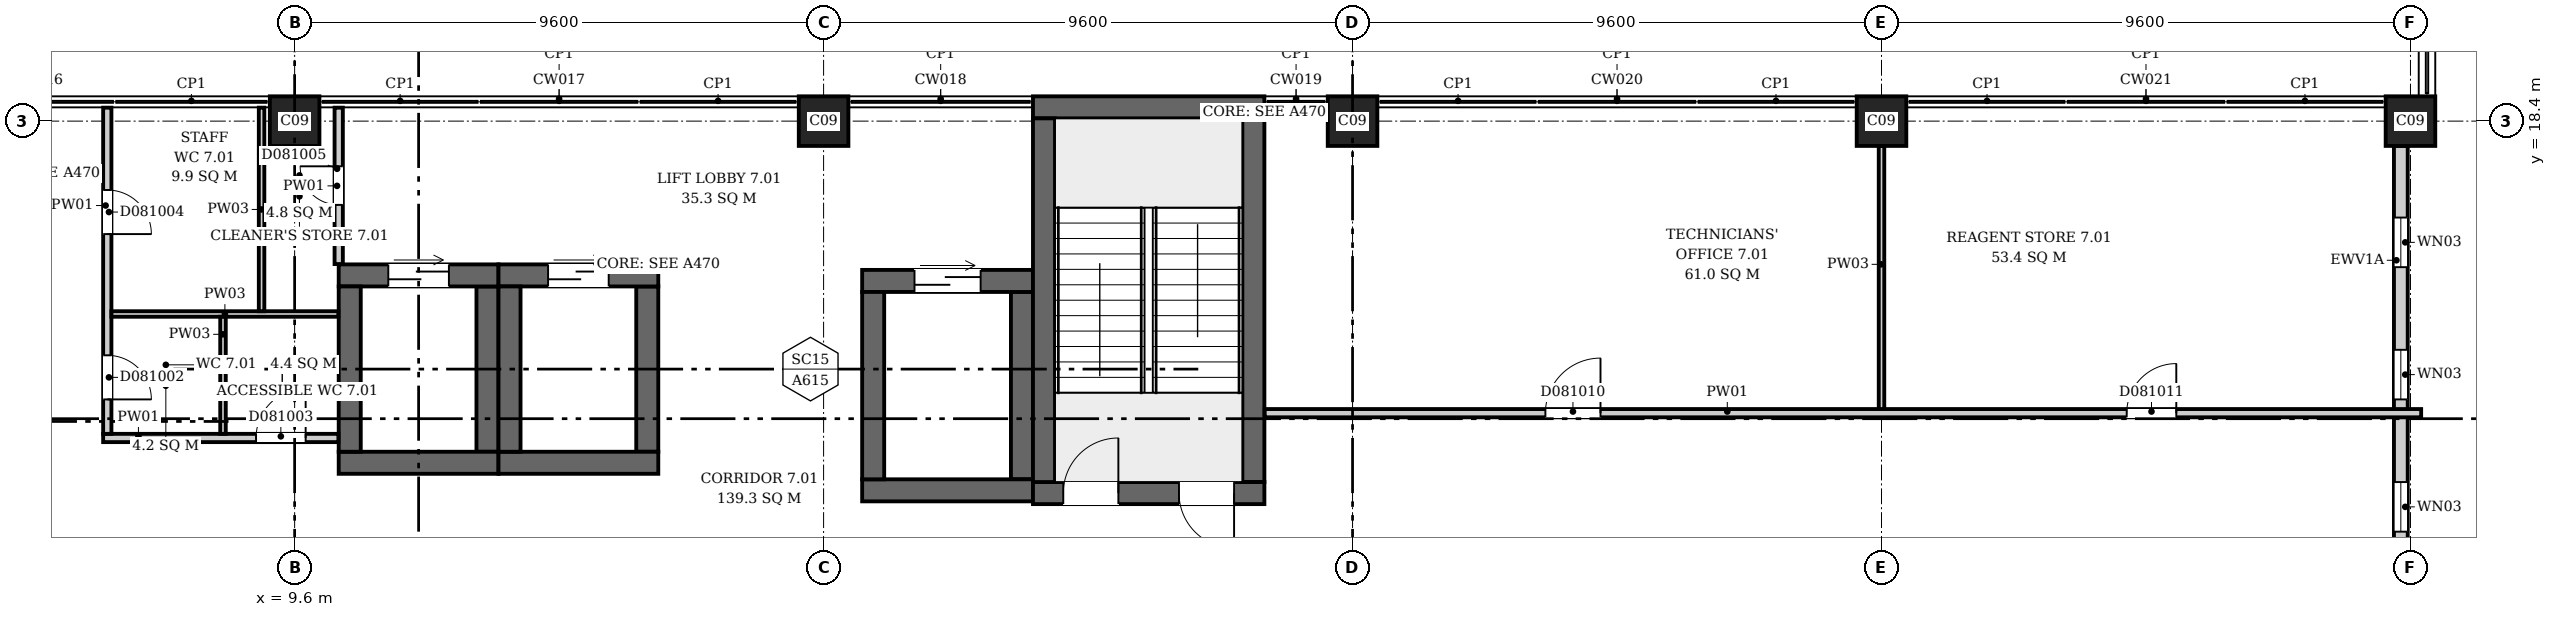
"""IFC4 building model, lengths in metres.
Left out: names, types, materials, properties, quantities, classifications, styles, units other than length and angle.
Written with IfcOpenShell. Run it as: python <this file> out.ifc"""

import sys

from ifc_helpers import new_model, si_unit, direction, frame, frame_2d, origin, origin_2d, place, context, subcontext, project, spatial, rectangle, extrude, element, fill, save


model = new_model("IFC4")
c1 = context("Model", 3, precision=1e-05, world=origin(), true_north=direction((0.0, 1.0)))
c2 = subcontext(c1, "Body", "Model", "MODEL_VIEW")
j1 = project(units=[si_unit("LENGTHUNIT", "METRE"), si_unit("PLANEANGLEUNIT", "RADIAN")], contexts=[c1])
p1 = place(None, origin())
s1 = spatial("IfcSite", under=j1, at=p1, CompositionType="ELEMENT")
p2 = place(p1, origin())
s2 = spatial("IfcBuilding", under=s1, at=p2, CompositionType="ELEMENT")
p3 = place(p2, frame((0.0, 0.0, 40.3)))
s3 = spatial("IfcBuildingStorey", under=s2, at=p3, CompositionType="ELEMENT", Elevation=40.3)
p4 = place(p3, frame((23.0, 11.65, 0.0), z_axis=(0.0, 0.0, 1.0), x_axis=(1.0, 0.0, 0.0)))
e1 = element("IfcWall", 1, at=p4, inside=s3, PredefinedType="SHEAR", context=c2, shape_type="SweptSolid", body=[
    extrude(rectangle(XDim=4.2, YDim=0.4, at=frame_2d((2.1, 0.0))), origin(), (0.0, 0.0, 1.0), 4.2),
])
p5 = place(p4, frame((0.55, 0.0, 0.0)))
e2 = element("IfcOpeningElement", 2, at=p5, cuts=e1, PredefinedType="OPENING", context=c2, shape_type="SweptSolid", body=[
    extrude(rectangle(XDim=1.0, YDim=2.1, at=frame_2d((0.5, 1.05))), frame((0.0, 0.21, 0.0), z_axis=(0.0, -1.0, 0.0), x_axis=(1.0, 0.0, 0.0)), (0.0, 0.0, 1.0), 0.42),
])
p6 = place(p4, frame((2.65, 0.0, 0.0)))
e3 = element("IfcOpeningElement", 3, at=p6, cuts=e1, PredefinedType="OPENING", context=c2, shape_type="SweptSolid", body=[
    extrude(rectangle(XDim=1.0, YDim=2.1, at=frame_2d((0.5, 1.05))), frame((0.0, 0.21, 0.0), z_axis=(0.0, -1.0, 0.0), x_axis=(1.0, 0.0, 0.0)), (0.0, 0.0, 1.0), 0.42),
])
p7 = place(p3, frame((23.0, 18.65, 0.0), z_axis=(0.0, 0.0, 1.0), x_axis=(1.0, 0.0, 0.0)))
e4 = element("IfcWall", 4, at=p7, inside=s3, PredefinedType="SHEAR", context=c2, shape_type="SweptSolid", body=[
    extrude(rectangle(XDim=4.2, YDim=0.4, at=frame_2d((2.1, 0.0))), origin(), (0.0, 0.0, 1.0), 4.2),
])
for number, where, z_axis, x_axis in (
    (5, (23.2, 11.85, 0.0), (0.0, 0.0, 1.0), (0.0, 1.0, 0.0)),
    (6, (27.0, 11.85, 0.0), (0.0, 0.0, 1.0), (0.0, 1.0, 0.0)),
):
    element("IfcWall", number, at=place(p3, frame(where, z_axis=z_axis, x_axis=x_axis)), inside=s3, PredefinedType="SHEAR", context=c2, shape_type="SweptSolid", body=[
        extrude(rectangle(XDim=6.6, YDim=0.4, at=frame_2d((3.3, 0.0))), origin(), (0.0, 0.0, 1.0), 4.2),
    ])
p8 = place(p3, frame((10.4, 12.2, 0.0), z_axis=(0.0, 0.0, 1.0), x_axis=(1.0, 0.0, 0.0)))
e7 = element("IfcWall", 7, at=p8, inside=s3, PredefinedType="SHEAR", context=c2, shape_type="SweptSolid", body=[
    extrude(rectangle(XDim=2.9, YDim=0.4, at=frame_2d((1.45, 0.0))), origin(), (0.0, 0.0, 1.0), 4.2),
])
p9 = place(p3, frame((10.4, 15.6, 0.0), z_axis=(0.0, 0.0, 1.0), x_axis=(1.0, 0.0, 0.0)))
e8 = element("IfcWall", 8, at=p9, inside=s3, PredefinedType="SHEAR", context=c2, shape_type="SweptSolid", body=[
    extrude(rectangle(XDim=2.9, YDim=0.4, at=frame_2d((1.45, 0.0))), origin(), (0.0, 0.0, 1.0), 4.2),
])
p10 = place(p9, frame((0.9, 0.0, 0.0)))
e9 = element("IfcOpeningElement", 9, at=p10, cuts=e8, PredefinedType="OPENING", context=c2, shape_type="SweptSolid", body=[
    extrude(rectangle(XDim=1.1, YDim=2.1, at=frame_2d((0.55, 1.05))), frame((0.0, 0.21, 0.0), z_axis=(0.0, -1.0, 0.0), x_axis=(1.0, 0.0, 0.0)), (0.0, 0.0, 1.0), 0.42),
])
for number, where, z_axis, x_axis in (
    (10, (10.6, 12.4, 0.0), (0.0, 0.0, 1.0), (0.0, 1.0, 0.0)),
    (11, (13.1, 12.4, 0.0), (0.0, 0.0, 1.0), (0.0, 1.0, 0.0)),
):
    element("IfcWall", number, at=place(p3, frame(where, z_axis=z_axis, x_axis=x_axis)), inside=s3, PredefinedType="SHEAR", context=c2, shape_type="SweptSolid", body=[
        extrude(rectangle(XDim=3.0, YDim=0.4, at=frame_2d((1.5, 0.0))), origin(), (0.0, 0.0, 1.0), 4.2),
    ])
p11 = place(p3, frame((13.3, 12.2, 0.0), z_axis=(0.0, 0.0, 1.0), x_axis=(1.0, 0.0, 0.0)))
e12 = element("IfcWall", 12, at=p11, inside=s3, PredefinedType="SHEAR", context=c2, shape_type="SweptSolid", body=[
    extrude(rectangle(XDim=2.9, YDim=0.4, at=frame_2d((1.45, 0.0))), origin(), (0.0, 0.0, 1.0), 4.2),
])
p12 = place(p3, frame((13.3, 15.6, 0.0), z_axis=(0.0, 0.0, 1.0), x_axis=(1.0, 0.0, 0.0)))
e13 = element("IfcWall", 13, at=p12, inside=s3, PredefinedType="SHEAR", context=c2, shape_type="SweptSolid", body=[
    extrude(rectangle(XDim=2.9, YDim=0.4, at=frame_2d((1.45, 0.0))), origin(), (0.0, 0.0, 1.0), 4.2),
])
p13 = place(p12, frame((0.9, 0.0, 0.0)))
e14 = element("IfcOpeningElement", 14, at=p13, cuts=e13, PredefinedType="OPENING", context=c2, shape_type="SweptSolid", body=[
    extrude(rectangle(XDim=1.1, YDim=2.1, at=frame_2d((0.55, 1.05))), frame((0.0, 0.21, 0.0), z_axis=(0.0, -1.0, 0.0), x_axis=(1.0, 0.0, 0.0)), (0.0, 0.0, 1.0), 0.42),
])
for number, where, z_axis, x_axis in (
    (15, (13.5, 12.4, 0.0), (0.0, 0.0, 1.0), (0.0, 1.0, 0.0)),
    (16, (16.0, 12.4, 0.0), (0.0, 0.0, 1.0), (0.0, 1.0, 0.0)),
):
    element("IfcWall", number, at=place(p3, frame(where, z_axis=z_axis, x_axis=x_axis)), inside=s3, PredefinedType="SHEAR", context=c2, shape_type="SweptSolid", body=[
        extrude(rectangle(XDim=3.0, YDim=0.4, at=frame_2d((1.5, 0.0))), origin(), (0.0, 0.0, 1.0), 4.2),
    ])
p14 = place(p3, frame((19.9, 11.7, 0.0), z_axis=(0.0, 0.0, 1.0), x_axis=(1.0, 0.0, 0.0)))
e17 = element("IfcWall", 17, at=p14, inside=s3, PredefinedType="SHEAR", context=c2, shape_type="SweptSolid", body=[
    extrude(rectangle(XDim=3.1, YDim=0.4, at=frame_2d((1.55, 0.0))), origin(), (0.0, 0.0, 1.0), 4.2),
])
p15 = place(p3, frame((19.9, 15.5, 0.0), z_axis=(0.0, 0.0, 1.0), x_axis=(1.0, 0.0, 0.0)))
e18 = element("IfcWall", 18, at=p15, inside=s3, PredefinedType="SHEAR", context=c2, shape_type="SweptSolid", body=[
    extrude(rectangle(XDim=3.1, YDim=0.4, at=frame_2d((1.55, 0.0))), origin(), (0.0, 0.0, 1.0), 4.2),
])
p16 = place(p15, frame((0.95, 0.0, 0.0)))
e19 = element("IfcOpeningElement", 19, at=p16, cuts=e18, PredefinedType="OPENING", context=c2, shape_type="SweptSolid", body=[
    extrude(rectangle(XDim=1.2, YDim=2.1, at=frame_2d((0.6, 1.05))), frame((0.0, 0.21, 0.0), z_axis=(0.0, -1.0, 0.0), x_axis=(1.0, 0.0, 0.0)), (0.0, 0.0, 1.0), 0.42),
])
for number, where, z_axis, x_axis in (
    (20, (20.1, 11.9, 0.0), (0.0, 0.0, 1.0), (0.0, 1.0, 0.0)),
    (21, (22.8, 11.9, 0.0), (0.0, 0.0, 1.0), (0.0, 1.0, 0.0)),
):
    element("IfcWall", number, at=place(p3, frame(where, z_axis=z_axis, x_axis=x_axis)), inside=s3, PredefinedType="SHEAR", context=c2, shape_type="SweptSolid", body=[
        extrude(rectangle(XDim=3.4, YDim=0.4, at=frame_2d((1.7, 0.0))), origin(), (0.0, 0.0, 1.0), 4.2),
    ])
for number, where, z_axis, x_axis in (
    (22, (9.6, 18.4, 0.0), (0.0, 0.0, 1.0), (1.0, 0.0, 0.0)),
    (23, (19.2, 18.4, 0.0), (0.0, 0.0, 1.0), (1.0, 0.0, 0.0)),
    (24, (28.8, 18.4, 0.0), (0.0, 0.0, 1.0), (1.0, 0.0, 0.0)),
    (25, (38.4, 18.4, 0.0), (0.0, 0.0, 1.0), (1.0, 0.0, 0.0)),
    (26, (48.0, 18.4, 0.0), (0.0, 0.0, 1.0), (1.0, 0.0, 0.0)),
):
    element("IfcColumn", number, at=place(p3, frame(where, z_axis=z_axis, x_axis=x_axis)), inside=s3, PredefinedType="COLUMN", context=c2, shape_type="SweptSolid", body=[
        extrude(rectangle(XDim=0.9, YDim=0.9, at=origin_2d()), origin(), (0.0, 0.0, 1.0), 4.2),
    ])
p17 = place(p3, frame((47.825, 9.65, 0.0), z_axis=(0.0, 0.0, 1.0), x_axis=(0.0, 1.0, 0.0)))
e27 = element("IfcWall", 27, at=p17, inside=s3, PredefinedType="ELEMENTEDWALL", context=c2, shape_type="SweptSolid", body=[
    extrude(rectangle(XDim=8.3, YDim=0.25, at=frame_2d((4.15, 0.0))), origin(), (0.0, 0.0, 1.0), 3.3),
])
p18 = place(p17, frame((1.3, 0.0, 0.6)))
e28 = element("IfcOpeningElement", 28, at=p18, cuts=e27, PredefinedType="OPENING", context=c2, shape_type="SweptSolid", body=[
    extrude(rectangle(XDim=0.9, YDim=2.6, at=frame_2d((0.45, 1.3))), frame((0.0, 0.135, 0.0), z_axis=(0.0, -1.0, 0.0), x_axis=(1.0, 0.0, 0.0)), (0.0, 0.0, 1.0), 0.27),
])
p19 = place(p17, frame((3.7, 0.0, 0.6)))
e29 = element("IfcOpeningElement", 29, at=p19, cuts=e27, PredefinedType="OPENING", context=c2, shape_type="SweptSolid", body=[
    extrude(rectangle(XDim=0.9, YDim=2.6, at=frame_2d((0.45, 1.3))), frame((0.0, 0.135, 0.0), z_axis=(0.0, -1.0, 0.0), x_axis=(1.0, 0.0, 0.0)), (0.0, 0.0, 1.0), 0.27),
])
p20 = place(p17, frame((6.1, 0.0, 0.6)))
e30 = element("IfcOpeningElement", 30, at=p20, cuts=e27, PredefinedType="OPENING", context=c2, shape_type="SweptSolid", body=[
    extrude(rectangle(XDim=0.9, YDim=2.6, at=frame_2d((0.45, 1.3))), frame((0.0, 0.135, 0.0), z_axis=(0.0, -1.0, 0.0), x_axis=(1.0, 0.0, 0.0)), (0.0, 0.0, 1.0), 0.27),
])
p21 = place(p3, frame((6.125, 12.65, 0.0), z_axis=(0.0, 0.0, 1.0), x_axis=(1.0, 0.0, 0.0)))
e31 = element("IfcWall", 31, at=p21, inside=s3, PredefinedType="PARTITIONING", context=c2, shape_type="SweptSolid", body=[
    extrude(rectangle(XDim=4.269, YDim=0.15, at=frame_2d((2.135, 0.0))), origin(), (0.0, 0.0, 1.0), 3.9),
])
p22 = place(p21, frame((2.775, 0.0, 0.0)))
e32 = element("IfcOpeningElement", 32, at=p22, cuts=e31, PredefinedType="OPENING", context=c2, shape_type="SweptSolid", body=[
    extrude(rectangle(XDim=0.9, YDim=2.1, at=frame_2d((0.45, 1.05))), frame((0.0, 0.085, 0.0), z_axis=(0.0, -1.0, 0.0), x_axis=(1.0, 0.0, 0.0)), (0.0, 0.0, 1.0), 0.17),
])
p23 = place(p3, frame((6.2, 12.725, 0.0), z_axis=(0.0, 0.0, 1.0), x_axis=(0.0, 1.0, 0.0)))
e33 = element("IfcWall", 33, at=p23, inside=s3, PredefinedType="PARTITIONING", context=c2, shape_type="SweptSolid", body=[
    extrude(rectangle(XDim=5.919, YDim=0.15, at=frame_2d((2.959, 0.0))), origin(), (0.0, 0.0, 1.0), 3.9),
])
p24 = place(p23, frame((0.625, 0.0, 0.0)))
e34 = element("IfcOpeningElement", 34, at=p24, cuts=e33, PredefinedType="OPENING", context=c2, shape_type="SweptSolid", body=[
    extrude(rectangle(XDim=0.8, YDim=2.1, at=frame_2d((0.4, 1.05))), frame((0.0, 0.085, 0.0), z_axis=(0.0, -1.0, 0.0), x_axis=(1.0, 0.0, 0.0)), (0.0, 0.0, 1.0), 0.17),
])
p25 = place(p23, frame((3.625, 0.0, 0.0)))
e35 = element("IfcOpeningElement", 35, at=p25, cuts=e33, PredefinedType="OPENING", context=c2, shape_type="SweptSolid", body=[
    extrude(rectangle(XDim=0.8, YDim=2.1, at=frame_2d((0.4, 1.05))), frame((0.0, 0.085, 0.0), z_axis=(0.0, -1.0, 0.0), x_axis=(1.0, 0.0, 0.0)), (0.0, 0.0, 1.0), 0.17),
])
p26 = place(p3, frame((6.275, 14.9, 0.0), z_axis=(0.0, 0.0, 1.0), x_axis=(1.0, 0.0, 0.0)))
e36 = element("IfcWall", 36, at=p26, inside=s3, PredefinedType="PARTITIONING", context=c2, shape_type="SweptSolid", body=[
    extrude(rectangle(XDim=4.119, YDim=0.1, at=frame_2d((2.06, 0.0))), origin(), (0.0, 0.0, 1.0), 3.9),
])
p27 = place(p3, frame((8.3, 12.725, 0.0), z_axis=(0.0, 0.0, 1.0), x_axis=(0.0, 1.0, 0.0)))
e37 = element("IfcWall", 37, at=p27, inside=s3, PredefinedType="PARTITIONING", context=c2, shape_type="SweptSolid", body=[
    extrude(rectangle(XDim=2.125, YDim=0.1, at=frame_2d((1.062, 0.0))), origin(), (0.0, 0.0, 1.0), 3.9),
])
p28 = place(p3, frame((9.0, 14.95, 0.0), z_axis=(0.0, 0.0, 1.0), x_axis=(0.0, 1.0, 0.0)))
e38 = element("IfcWall", 38, at=p28, inside=s3, PredefinedType="PARTITIONING", context=c2, shape_type="SweptSolid", body=[
    extrude(rectangle(XDim=3.694, YDim=0.1, at=frame_2d((1.847, 0.0))), origin(), (0.0, 0.0, 1.0), 3.9),
])
p29 = place(p3, frame((10.4, 15.806, 0.0), z_axis=(0.0, 0.0, 1.0), x_axis=(0.0, 1.0, 0.0)))
e39 = element("IfcWall", 39, at=p29, inside=s3, PredefinedType="PARTITIONING", context=c2, shape_type="SweptSolid", body=[
    extrude(rectangle(XDim=2.838, YDim=0.15, at=frame_2d((1.419, 0.0))), origin(), (0.0, 0.0, 1.0), 3.9),
])
p30 = place(p29, frame((1.074, 0.0, 0.0)))
e40 = element("IfcOpeningElement", 40, at=p30, cuts=e39, PredefinedType="OPENING", context=c2, shape_type="SweptSolid", body=[
    extrude(rectangle(XDim=0.7, YDim=2.1, at=frame_2d((0.35, 1.05))), frame((0.0, 0.085, 0.0), z_axis=(0.0, -1.0, 0.0), x_axis=(1.0, 0.0, 0.0)), (0.0, 0.0, 1.0), 0.17),
])
p31 = place(p3, frame((27.206, 13.1, 0.0), z_axis=(0.0, 0.0, 1.0), x_axis=(1.0, 0.0, 0.0)))
e41 = element("IfcWall", 41, at=p31, inside=s3, PredefinedType="PARTITIONING", context=c2, shape_type="SweptSolid", body=[
    extrude(rectangle(XDim=20.988, YDim=0.15, at=frame_2d((10.494, 0.0))), origin(), (0.0, 0.0, 1.0), 3.9),
])
p32 = place(p31, frame((5.094, 0.0, 0.0)))
e42 = element("IfcOpeningElement", 42, at=p32, cuts=e41, PredefinedType="OPENING", context=c2, shape_type="SweptSolid", body=[
    extrude(rectangle(XDim=1.0, YDim=2.1, at=frame_2d((0.5, 1.05))), frame((0.0, 0.085, 0.0), z_axis=(0.0, -1.0, 0.0), x_axis=(1.0, 0.0, 0.0)), (0.0, 0.0, 1.0), 0.17),
])
p33 = place(p31, frame((15.644, 0.0, 0.0)))
e43 = element("IfcOpeningElement", 43, at=p33, cuts=e41, PredefinedType="OPENING", context=c2, shape_type="SweptSolid", body=[
    extrude(rectangle(XDim=0.9, YDim=2.1, at=frame_2d((0.45, 1.05))), frame((0.0, 0.085, 0.0), z_axis=(0.0, -1.0, 0.0), x_axis=(1.0, 0.0, 0.0)), (0.0, 0.0, 1.0), 0.17),
])
p34 = place(p3, frame((38.4, 13.175, 0.0), z_axis=(0.0, 0.0, 1.0), x_axis=(0.0, 1.0, 0.0)))
e44 = element("IfcWall", 44, at=p34, inside=s3, PredefinedType="PARTITIONING", context=c2, shape_type="SweptSolid", body=[
    extrude(rectangle(XDim=4.775, YDim=0.1, at=frame_2d((2.387, 0.0))), origin(), (0.0, 0.0, 1.0), 3.9),
])
p35 = place(p18, origin())
e45 = element("IfcWindow", 45, at=p35, inside=s3, PartitioningType="SINGLE_PANEL", PredefinedType="WINDOW", context=c2, shape_type="SweptSolid", body=[
    extrude(rectangle(XDim=0.9, YDim=2.6, at=frame_2d((0.45, 1.3))), frame((0.0, 0.03, 0.0), z_axis=(0.0, -1.0, 0.0), x_axis=(1.0, 0.0, 0.0)), (0.0, 0.0, 1.0), 0.06),
])
fill(e28, e45)
p36 = place(p19, origin())
e46 = element("IfcWindow", 46, at=p36, inside=s3, PartitioningType="SINGLE_PANEL", PredefinedType="WINDOW", context=c2, shape_type="SweptSolid", body=[
    extrude(rectangle(XDim=0.9, YDim=2.6, at=frame_2d((0.45, 1.3))), frame((0.0, 0.03, 0.0), z_axis=(0.0, -1.0, 0.0), x_axis=(1.0, 0.0, 0.0)), (0.0, 0.0, 1.0), 0.06),
])
fill(e29, e46)
p37 = place(p20, origin())
e47 = element("IfcWindow", 47, at=p37, inside=s3, PartitioningType="SINGLE_PANEL", PredefinedType="WINDOW", context=c2, shape_type="SweptSolid", body=[
    extrude(rectangle(XDim=0.9, YDim=2.6, at=frame_2d((0.45, 1.3))), frame((0.0, 0.03, 0.0), z_axis=(0.0, -1.0, 0.0), x_axis=(1.0, 0.0, 0.0)), (0.0, 0.0, 1.0), 0.06),
])
fill(e30, e47)
p38 = place(p5, origin())
e48 = element("IfcDoor", 48, at=p38, inside=s3, OperationType="SINGLE_SWING_RIGHT", PredefinedType="DOOR", context=c2, shape_type="SweptSolid", body=[
    extrude(rectangle(XDim=1.0, YDim=2.1, at=frame_2d((0.5, 1.05))), frame((0.0, 0.025, 0.0), z_axis=(0.0, -1.0, 0.0), x_axis=(1.0, 0.0, 0.0)), (0.0, 0.0, 1.0), 0.05),
])
fill(e2, e48)
p39 = place(p6, origin())
e49 = element("IfcDoor", 49, at=p39, inside=s3, OperationType="SINGLE_SWING_LEFT", PredefinedType="DOOR", context=c2, shape_type="SweptSolid", body=[
    extrude(rectangle(XDim=1.0, YDim=2.1, at=frame_2d((0.5, 1.05))), frame((0.0, 0.025, 0.0), z_axis=(0.0, -1.0, 0.0), x_axis=(1.0, 0.0, 0.0)), (0.0, 0.0, 1.0), 0.05),
])
fill(e3, e49)
p40 = place(p10, origin())
e50 = element("IfcDoor", 50, at=p40, inside=s3, OperationType="DOUBLE_DOOR_SLIDING", PredefinedType="DOOR", context=c2, shape_type="SweptSolid", body=[
    extrude(rectangle(XDim=1.1, YDim=2.1, at=frame_2d((0.55, 1.05))), frame((0.0, 0.025, 0.0), z_axis=(0.0, -1.0, 0.0), x_axis=(1.0, 0.0, 0.0)), (0.0, 0.0, 1.0), 0.05),
])
fill(e9, e50)
p41 = place(p13, origin())
e51 = element("IfcDoor", 51, at=p41, inside=s3, OperationType="DOUBLE_DOOR_SLIDING", PredefinedType="DOOR", context=c2, shape_type="SweptSolid", body=[
    extrude(rectangle(XDim=1.1, YDim=2.1, at=frame_2d((0.55, 1.05))), frame((0.0, 0.025, 0.0), z_axis=(0.0, -1.0, 0.0), x_axis=(1.0, 0.0, 0.0)), (0.0, 0.0, 1.0), 0.05),
])
fill(e14, e51)
p42 = place(p16, origin())
e52 = element("IfcDoor", 52, at=p42, inside=s3, OperationType="DOUBLE_DOOR_SLIDING", PredefinedType="DOOR", context=c2, shape_type="SweptSolid", body=[
    extrude(rectangle(XDim=1.2, YDim=2.1, at=frame_2d((0.6, 1.05))), frame((0.0, 0.025, 0.0), z_axis=(0.0, -1.0, 0.0), x_axis=(1.0, 0.0, 0.0)), (0.0, 0.0, 1.0), 0.05),
])
fill(e19, e52)
p43 = place(p24, origin())
e53 = element("IfcDoor", 53, at=p43, inside=s3, OperationType="SINGLE_SWING_LEFT", PredefinedType="DOOR", context=c2, shape_type="SweptSolid", body=[
    extrude(rectangle(XDim=0.8, YDim=2.1, at=frame_2d((0.4, 1.05))), frame((0.0, 0.025, 0.0), z_axis=(0.0, -1.0, 0.0), x_axis=(1.0, 0.0, 0.0)), (0.0, 0.0, 1.0), 0.05),
])
fill(e34, e53)
p44 = place(p22, origin())
e54 = element("IfcDoor", 54, at=p44, inside=s3, OperationType="SINGLE_SWING_RIGHT", PredefinedType="DOOR", context=c2, shape_type="SweptSolid", body=[
    extrude(rectangle(XDim=0.9, YDim=2.1, at=frame_2d((0.45, 1.05))), frame((0.0, 0.025, 0.0), z_axis=(0.0, -1.0, 0.0), x_axis=(1.0, 0.0, 0.0)), (0.0, 0.0, 1.0), 0.05),
])
fill(e32, e54)
p45 = place(p25, origin())
e55 = element("IfcDoor", 55, at=p45, inside=s3, OperationType="SINGLE_SWING_LEFT", PredefinedType="DOOR", context=c2, shape_type="SweptSolid", body=[
    extrude(rectangle(XDim=0.8, YDim=2.1, at=frame_2d((0.4, 1.05))), frame((0.0, 0.025, 0.0), z_axis=(0.0, -1.0, 0.0), x_axis=(1.0, 0.0, 0.0)), (0.0, 0.0, 1.0), 0.05),
])
fill(e35, e55)
p46 = place(p30, origin())
e56 = element("IfcDoor", 56, at=p46, inside=s3, OperationType="SINGLE_SWING_LEFT", PredefinedType="DOOR", context=c2, shape_type="SweptSolid", body=[
    extrude(rectangle(XDim=0.7, YDim=2.1, at=frame_2d((0.35, 1.05))), frame((0.0, 0.025, 0.0), z_axis=(0.0, -1.0, 0.0), x_axis=(1.0, 0.0, 0.0)), (0.0, 0.0, 1.0), 0.05),
])
fill(e40, e56)
p47 = place(p32, origin())
e57 = element("IfcDoor", 57, at=p47, inside=s3, OperationType="SINGLE_SWING_LEFT", PredefinedType="DOOR", context=c2, shape_type="SweptSolid", body=[
    extrude(rectangle(XDim=1.0, YDim=2.1, at=frame_2d((0.5, 1.05))), frame((0.0, 0.025, 0.0), z_axis=(0.0, -1.0, 0.0), x_axis=(1.0, 0.0, 0.0)), (0.0, 0.0, 1.0), 0.05),
])
fill(e42, e57)
p48 = place(p33, origin())
e58 = element("IfcDoor", 58, at=p48, inside=s3, OperationType="SINGLE_SWING_RIGHT", PredefinedType="DOOR", context=c2, shape_type="SweptSolid", body=[
    extrude(rectangle(XDim=0.9, YDim=2.1, at=frame_2d((0.45, 1.05))), frame((0.0, 0.025, 0.0), z_axis=(0.0, -1.0, 0.0), x_axis=(1.0, 0.0, 0.0)), (0.0, 0.0, 1.0), 0.05),
])
fill(e43, e58)
save(model, sys.argv[1])
